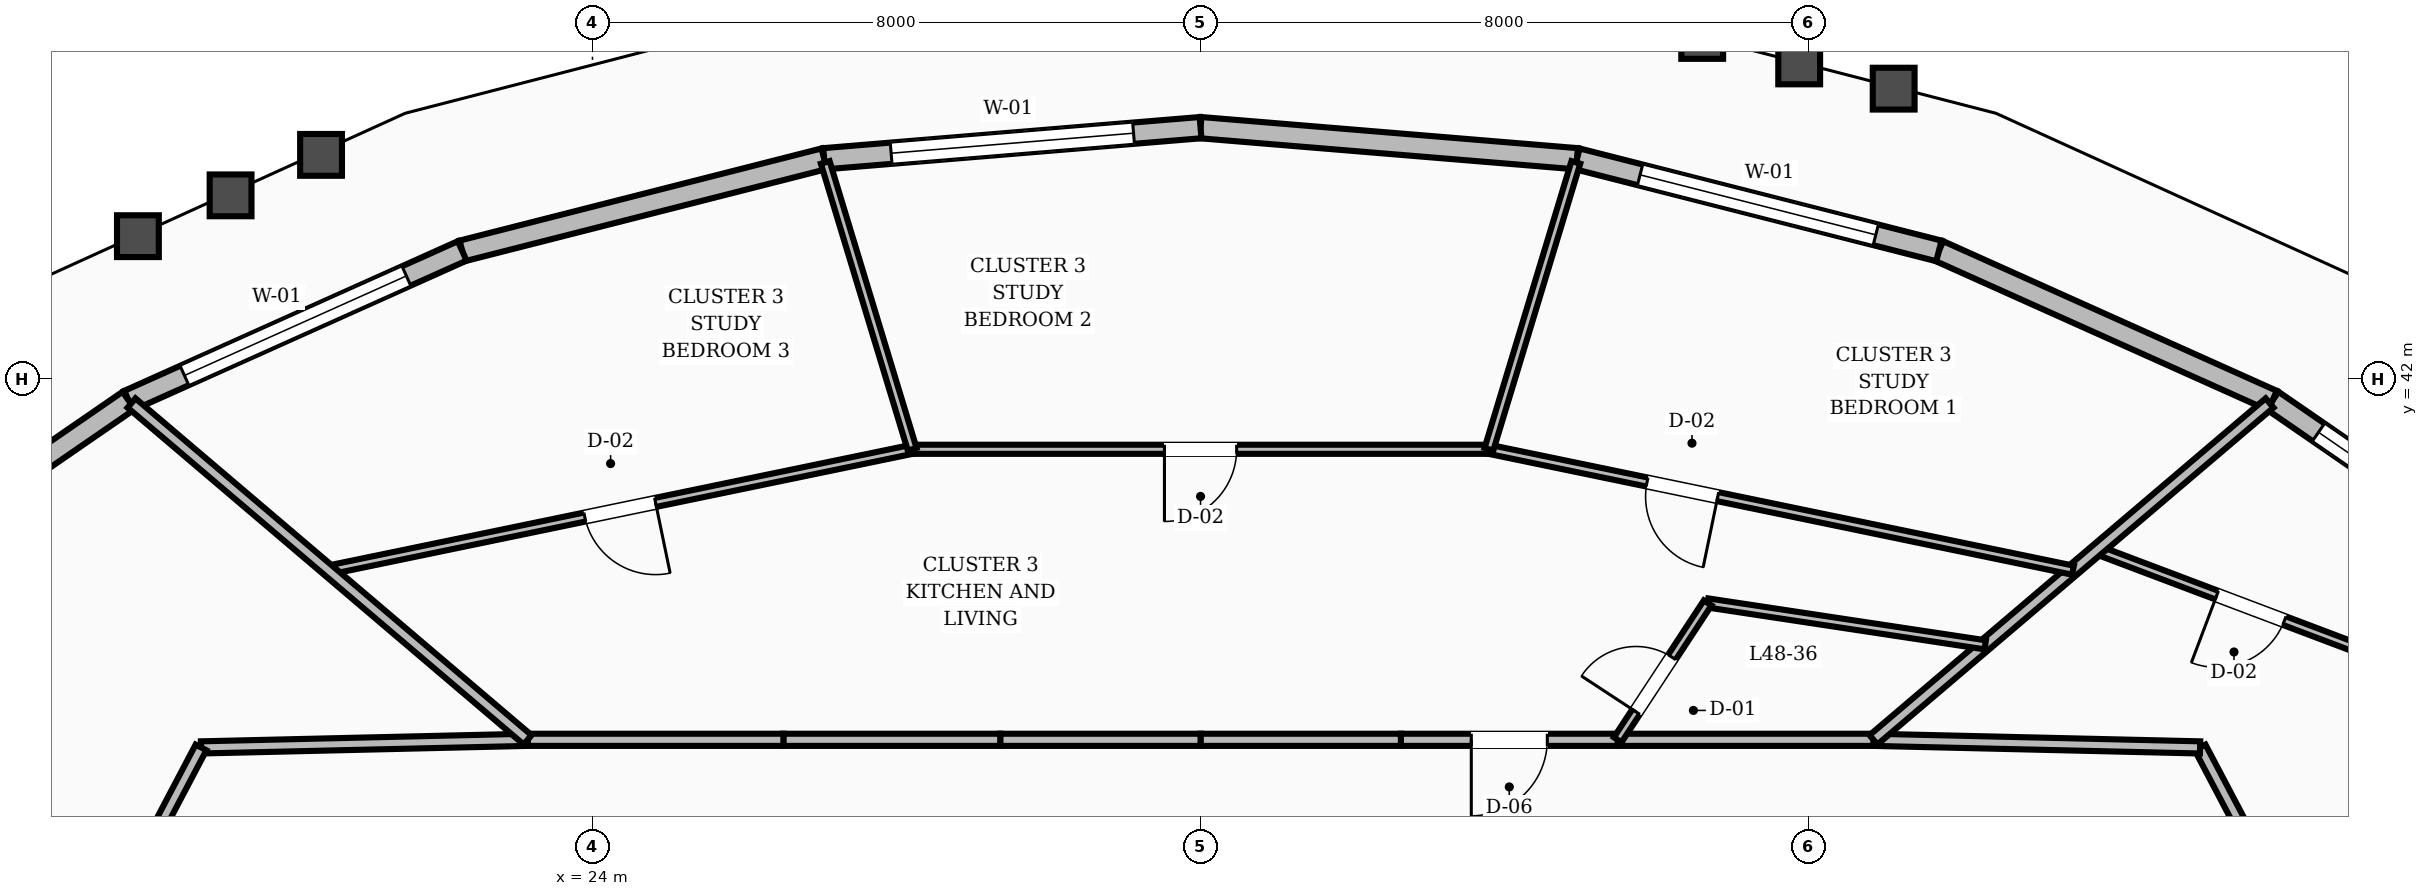
"""IFC4 building model, lengths in metres.
Left out: names, types, materials, properties, quantities, classifications, styles, units other than length and angle.
Written with IfcOpenShell. Run it as: python <this file> out.ifc"""

import sys

from ifc_helpers import new_model, si_unit, direction, frame, frame_2d, origin, place, context, subcontext, project, spatial, rectangle, extrude, element, fill, save


model = new_model("IFC4")
c1 = context("Model", 3, precision=1e-05, world=origin(), true_north=direction((0.0, 1.0)))
c2 = subcontext(c1, "Body", "Model", "MODEL_VIEW")
j1 = project(units=[si_unit("LENGTHUNIT", "METRE"), si_unit("PLANEANGLEUNIT", "RADIAN")], contexts=[c1])
p1 = place(None, origin())
s1 = spatial("IfcSite", under=j1, at=p1, CompositionType="ELEMENT")
p2 = place(p1, origin())
s2 = spatial("IfcBuilding", under=s1, at=p2, CompositionType="ELEMENT")
p3 = place(p2, frame((0.0, 0.0, 185.6)))
s3 = spatial("IfcBuildingStorey", under=s2, at=p3, CompositionType="ELEMENT", Elevation=185.6)
p4 = place(p3, frame((49.949, 39.064, 0.0), z_axis=(0.0, 0.0, 1.0), x_axis=(-0.823542873284, 0.567254031157, 0.0)))
e1 = element("IfcWall", 1, at=p4, inside=s3, PredefinedType="STANDARD", context=c2, shape_type="SweptSolid", body=[
    extrude(rectangle(XDim=4.671, YDim=0.28, at=frame_2d((2.335, 0.0))), origin(), (0.0, 0.0, 1.0), 2.82),
])
p5 = place(p4, frame((0.735, 0.0, 0.8)))
e2 = element("IfcOpeningElement", 2, at=p5, cuts=e1, PredefinedType="OPENING", context=c2, shape_type="SweptSolid", body=[
    extrude(rectangle(XDim=3.2, YDim=1.65, at=frame_2d((1.6, 0.825))), frame((0.0, 0.15, 0.0), z_axis=(0.0, -1.0, 0.0), x_axis=(1.0, 0.0, 0.0)), (0.0, 0.0, 1.0), 0.3),
])
p6 = place(p3, frame((46.102, 41.713, 0.0), z_axis=(0.0, 0.0, 1.0), x_axis=(-0.91240998906, 0.409277426525, 0.0)))
e3 = element("IfcWall", 3, at=p6, inside=s3, PredefinedType="STANDARD", context=c2, shape_type="SweptSolid", body=[
    extrude(rectangle(XDim=4.81, YDim=0.28, at=frame_2d((2.405, 0.0))), origin(), (0.0, 0.0, 1.0), 2.82),
])
p7 = place(p3, frame((41.714, 43.682, 0.0), z_axis=(0.0, 0.0, 1.0), x_axis=(-0.969081190832, 0.246742062842, 0.0)))
e4 = element("IfcWall", 4, at=p7, inside=s3, PredefinedType="STANDARD", context=c2, shape_type="SweptSolid", body=[
    extrude(rectangle(XDim=4.914, YDim=0.28, at=frame_2d((2.457, 0.0))), origin(), (0.0, 0.0, 1.0), 2.82),
])
p8 = place(p7, frame((0.857, 0.0, 0.8)))
e5 = element("IfcOpeningElement", 5, at=p8, cuts=e4, PredefinedType="OPENING", context=c2, shape_type="SweptSolid", body=[
    extrude(rectangle(XDim=3.2, YDim=1.65, at=frame_2d((1.6, 0.825))), frame((0.0, 0.15, 0.0), z_axis=(0.0, -1.0, 0.0), x_axis=(1.0, 0.0, 0.0)), (0.0, 0.0, 1.0), 0.3),
])
p9 = place(p3, frame((36.952, 44.894, 0.0), z_axis=(0.0, 0.0, 1.0), x_axis=(-0.996599760846, 0.082394882614, 0.0)))
e6 = element("IfcWall", 6, at=p9, inside=s3, PredefinedType="STANDARD", context=c2, shape_type="SweptSolid", body=[
    extrude(rectangle(XDim=4.969, YDim=0.28, at=frame_2d((2.484, 0.0))), origin(), (0.0, 0.0, 1.0), 2.82),
])
p10 = place(p3, frame((32.0, 45.304, 0.0), z_axis=(0.0, 0.0, 1.0), x_axis=(-0.996599760846, -0.082394882614, 0.0)))
e7 = element("IfcWall", 7, at=p10, inside=s3, PredefinedType="STANDARD", context=c2, shape_type="SweptSolid", body=[
    extrude(rectangle(XDim=4.969, YDim=0.28, at=frame_2d((2.484, 0.0))), origin(), (0.0, 0.0, 1.0), 2.82),
])
p11 = place(p10, frame((0.885, 0.0, 0.8)))
e8 = element("IfcOpeningElement", 8, at=p11, cuts=e7, PredefinedType="OPENING", context=c2, shape_type="SweptSolid", body=[
    extrude(rectangle(XDim=3.2, YDim=1.65, at=frame_2d((1.6, 0.825))), frame((0.0, 0.15, 0.0), z_axis=(0.0, -1.0, 0.0), x_axis=(1.0, 0.0, 0.0)), (0.0, 0.0, 1.0), 0.3),
])
p12 = place(p3, frame((27.048, 44.894, 0.0), z_axis=(0.0, 0.0, 1.0), x_axis=(-0.969081190832, -0.246742062842, 0.0)))
e9 = element("IfcWall", 9, at=p12, inside=s3, PredefinedType="STANDARD", context=c2, shape_type="SweptSolid", body=[
    extrude(rectangle(XDim=4.914, YDim=0.28, at=frame_2d((2.457, 0.0))), origin(), (0.0, 0.0, 1.0), 2.82),
])
p13 = place(p3, frame((22.286, 43.682, 0.0), z_axis=(0.0, 0.0, 1.0), x_axis=(-0.91240998906, -0.409277426525, 0.0)))
e10 = element("IfcWall", 10, at=p13, inside=s3, PredefinedType="STANDARD", context=c2, shape_type="SweptSolid", body=[
    extrude(rectangle(XDim=4.81, YDim=0.28, at=frame_2d((2.405, 0.0))), origin(), (0.0, 0.0, 1.0), 2.82),
])
p14 = place(p13, frame((0.805, 0.0, 0.8)))
e11 = element("IfcOpeningElement", 11, at=p14, cuts=e10, PredefinedType="OPENING", context=c2, shape_type="SweptSolid", body=[
    extrude(rectangle(XDim=3.2, YDim=1.65, at=frame_2d((1.6, 0.825))), frame((0.0, 0.15, 0.0), z_axis=(0.0, -1.0, 0.0), x_axis=(1.0, 0.0, 0.0)), (0.0, 0.0, 1.0), 0.3),
])
p15 = place(p3, frame((17.898, 41.713, 0.0), z_axis=(0.0, 0.0, 1.0), x_axis=(-0.823542873284, -0.567254031157, 0.0)))
e12 = element("IfcWall", 12, at=p15, inside=s3, PredefinedType="STANDARD", context=c2, shape_type="SweptSolid", body=[
    extrude(rectangle(XDim=4.671, YDim=0.28, at=frame_2d((2.335, 0.0))), origin(), (0.0, 0.0, 1.0), 2.82),
])
p16 = place(p3, frame((46.85, 33.923, 0.0), z_axis=(0.0, 0.0, 1.0), x_axis=(-0.466093963429, 0.884735224378, 0.0)))
e13 = element("IfcWall", 13, at=p16, inside=s3, PredefinedType="SOLIDWALL", context=c2, shape_type="SweptSolid", body=[
    extrude(rectangle(XDim=3.648, YDim=0.16, at=frame_2d((1.824, 0.0))), origin(), (0.0, 0.0, 1.0), 2.8),
])
p17 = place(p3, frame((45.15, 37.15, 0.0), z_axis=(0.0, 0.0, 1.0), x_axis=(-0.999728709658, 0.023291781507, 0.0)))
e14 = element("IfcWall", 14, at=p17, inside=s3, PredefinedType="SOLIDWALL", context=c2, shape_type="SweptSolid", body=[
    extrude(rectangle(XDim=4.298, YDim=0.16, at=frame_2d((2.149, 0.0))), origin(), (0.0, 0.0, 1.0), 2.8),
])
p18 = place(p3, frame((40.854, 37.25, 0.0), z_axis=(0.0, 0.0, 1.0), x_axis=(-1.0, 0.0, 0.0)))
e15 = element("IfcWall", 15, at=p18, inside=s3, PredefinedType="SOLIDWALL", context=c2, shape_type="SweptSolid", body=[
    extrude(rectangle(XDim=3.365, YDim=0.16, at=frame_2d((1.683, 0.0))), origin(), (0.0, 0.0, 1.0), 2.8),
])
p19 = place(p3, frame((37.488, 37.25, 0.0), z_axis=(0.0, 0.0, 1.0), x_axis=(-1.0, 0.0, 0.0)))
e16 = element("IfcWall", 16, at=p19, inside=s3, PredefinedType="SOLIDWALL", context=c2, shape_type="SweptSolid", body=[
    extrude(rectangle(XDim=2.853, YDim=0.16, at=frame_2d((1.426, 0.0))), origin(), (0.0, 0.0, 1.0), 2.8),
])
p20 = place(p19, frame((0.927, 0.0, 0.0)))
e17 = element("IfcOpeningElement", 17, at=p20, cuts=e16, PredefinedType="OPENING", context=c2, shape_type="SweptSolid", body=[
    extrude(rectangle(XDim=1.0, YDim=2.1, at=frame_2d((0.5, 1.05))), frame((0.0, 0.09, 0.0), z_axis=(0.0, -1.0, 0.0), x_axis=(1.0, 0.0, 0.0)), (0.0, 0.0, 1.0), 0.18),
])
for number, where, z_axis, x_axis in (
    (18, (34.635, 37.25, 0.0), (0.0, 0.0, 1.0), (-1.0, 0.0, 0.0)),
    (19, (32.0, 37.25, 0.0), (0.0, 0.0, 1.0), (-1.0, 0.0, 0.0)),
):
    element("IfcWall", number, at=place(p3, frame(where, z_axis=z_axis, x_axis=x_axis)), inside=s3, PredefinedType="SOLIDWALL", context=c2, shape_type="SweptSolid", body=[
        extrude(rectangle(XDim=2.635, YDim=0.16, at=frame_2d((1.318, 0.0))), origin(), (0.0, 0.0, 1.0), 2.8),
    ])
p21 = place(p3, frame((29.365, 37.25, 0.0), z_axis=(0.0, 0.0, 1.0), x_axis=(-1.0, 0.0, 0.0)))
e20 = element("IfcWall", 20, at=p21, inside=s3, PredefinedType="SOLIDWALL", context=c2, shape_type="SweptSolid", body=[
    extrude(rectangle(XDim=2.853, YDim=0.16, at=frame_2d((1.426, 0.0))), origin(), (0.0, 0.0, 1.0), 2.8),
])
p22 = place(p3, frame((26.512, 37.25, 0.0), z_axis=(0.0, 0.0, 1.0), x_axis=(-1.0, 0.0, 0.0)))
e21 = element("IfcWall", 21, at=p22, inside=s3, PredefinedType="SOLIDWALL", context=c2, shape_type="SweptSolid", body=[
    extrude(rectangle(XDim=3.365, YDim=0.16, at=frame_2d((1.683, 0.0))), origin(), (0.0, 0.0, 1.0), 2.8),
])
p23 = place(p3, frame((23.146, 37.25, 0.0), z_axis=(0.0, 0.0, 1.0), x_axis=(-0.999728709658, -0.023291781507, 0.0)))
e22 = element("IfcWall", 22, at=p23, inside=s3, PredefinedType="SOLIDWALL", context=c2, shape_type="SweptSolid", body=[
    extrude(rectangle(XDim=4.298, YDim=0.16, at=frame_2d((2.149, 0.0))), origin(), (0.0, 0.0, 1.0), 2.8),
])
p24 = place(p3, frame((18.85, 37.15, 0.0), z_axis=(0.0, 0.0, 1.0), x_axis=(-0.466093963429, -0.884735224378, 0.0)))
e23 = element("IfcWall", 23, at=p24, inside=s3, PredefinedType="SOLIDWALL", context=c2, shape_type="SweptSolid", body=[
    extrude(rectangle(XDim=3.648, YDim=0.16, at=frame_2d((1.824, 0.0))), origin(), (0.0, 0.0, 1.0), 2.8),
])
p25 = place(p3, frame((47.837, 38.222, 0.0), z_axis=(0.0, 0.0, 1.0), x_axis=(-0.935484123415, 0.353368723627, 0.0)))
e24 = element("IfcWall", 24, at=p25, inside=s3, PredefinedType="PARTITIONING", context=c2, shape_type="SweptSolid", body=[
    extrude(rectangle(XDim=4.324, YDim=0.12, at=frame_2d((2.162, 0.0))), origin(), (0.0, 0.0, 1.0), 2.8),
])
p26 = place(p25, frame((1.687, 0.0, 0.0)))
e25 = element("IfcOpeningElement", 25, at=p26, cuts=e24, PredefinedType="OPENING", context=c2, shape_type="SweptSolid", body=[
    extrude(rectangle(XDim=0.95, YDim=2.1, at=frame_2d((0.475, 1.05))), frame((0.0, 0.07, 0.0), z_axis=(0.0, -1.0, 0.0), x_axis=(1.0, 0.0, 0.0)), (0.0, 0.0, 1.0), 0.14),
])
p27 = place(p3, frame((40.854, 37.25, 0.0), z_axis=(0.0, 0.0, 1.0), x_axis=(0.761808080293, 0.647802785421, 0.0)))
e26 = element("IfcWall", 26, at=p27, inside=s3, PredefinedType="SOLIDWALL", context=c2, shape_type="SweptSolid", body=[
    extrude(rectangle(XDim=6.84, YDim=0.16, at=frame_2d((3.42, 0.0))), origin(), (0.0, 0.0, 1.0), 2.8),
])
p28 = place(p3, frame((42.323, 38.5, 0.0), z_axis=(0.0, 0.0, 1.0), x_axis=(-0.988795772928, 0.149274644332, 0.0)))
e27 = element("IfcWall", 27, at=p28, inside=s3, PredefinedType="PARTITIONING", context=c2, shape_type="SweptSolid", body=[
    extrude(rectangle(XDim=3.693, YDim=0.12, at=frame_2d((1.846, 0.0))), origin(), (0.0, 0.0, 1.0), 2.8),
])
p29 = place(p3, frame((37.488, 37.25, 0.0), z_axis=(0.0, 0.0, 1.0), x_axis=(0.549039971379, 0.835796093451, 0.0)))
e28 = element("IfcWall", 28, at=p29, inside=s3, PredefinedType="PARTITIONING", context=c2, shape_type="SweptSolid", body=[
    extrude(rectangle(XDim=2.155, YDim=0.12, at=frame_2d((1.077, 0.0))), origin(), (0.0, 0.0, 1.0), 2.8),
])
p30 = place(p29, frame((0.44, 0.0, 0.0)))
e29 = element("IfcOpeningElement", 29, at=p30, cuts=e28, PredefinedType="OPENING", context=c2, shape_type="SweptSolid", body=[
    extrude(rectangle(XDim=0.86, YDim=2.1, at=frame_2d((0.43, 1.05))), frame((0.0, 0.07, 0.0), z_axis=(0.0, -1.0, 0.0), x_axis=(1.0, 0.0, 0.0)), (0.0, 0.0, 1.0), 0.14),
])
p31 = place(p3, frame((43.478, 39.482, 0.0), z_axis=(0.0, 0.0, 1.0), x_axis=(-0.979241044983, 0.202699225013, 0.0)))
e30 = element("IfcWall", 30, at=p31, inside=s3, PredefinedType="PARTITIONING", context=c2, shape_type="SweptSolid", body=[
    extrude(rectangle(XDim=7.847, YDim=0.12, at=frame_2d((3.923, 0.0))), origin(), (0.0, 0.0, 1.0), 2.8),
])
p32 = place(p31, frame((4.772, 0.0, 0.0)))
e31 = element("IfcOpeningElement", 31, at=p32, cuts=e30, PredefinedType="OPENING", context=c2, shape_type="SweptSolid", body=[
    extrude(rectangle(XDim=0.95, YDim=2.1, at=frame_2d((0.475, 1.05))), frame((0.0, 0.07, 0.0), z_axis=(0.0, -1.0, 0.0), x_axis=(1.0, 0.0, 0.0)), (0.0, 0.0, 1.0), 0.14),
])
p33 = place(p3, frame((35.794, 41.072, 0.0), z_axis=(0.0, 0.0, 1.0), x_axis=(-1.0, 0.0, 0.0)))
e32 = element("IfcWall", 32, at=p33, inside=s3, PredefinedType="PARTITIONING", context=c2, shape_type="SweptSolid", body=[
    extrude(rectangle(XDim=7.587, YDim=0.12, at=frame_2d((3.794, 0.0))), origin(), (0.0, 0.0, 1.0), 2.8),
])
p34 = place(p33, frame((3.319, 0.0, 0.0)))
e33 = element("IfcOpeningElement", 33, at=p34, cuts=e32, PredefinedType="OPENING", context=c2, shape_type="SweptSolid", body=[
    extrude(rectangle(XDim=0.95, YDim=2.1, at=frame_2d((0.475, 1.05))), frame((0.0, 0.07, 0.0), z_axis=(0.0, -1.0, 0.0), x_axis=(1.0, 0.0, 0.0)), (0.0, 0.0, 1.0), 0.14),
])
p35 = place(p3, frame((35.794, 41.072, 0.0), z_axis=(0.0, 0.0, 1.0), x_axis=(0.290033167967, 0.95701659415, 0.0)))
e34 = element("IfcWall", 34, at=p35, inside=s3, PredefinedType="PARTITIONING", context=c2, shape_type="SweptSolid", body=[
    extrude(rectangle(XDim=3.944, YDim=0.12, at=frame_2d((1.972, 0.0))), origin(), (0.0, 0.0, 1.0), 2.8),
])
p36 = place(p3, frame((28.206, 41.072, 0.0), z_axis=(0.0, 0.0, 1.0), x_axis=(-0.979241044983, -0.202699225013, 0.0)))
e35 = element("IfcWall", 35, at=p36, inside=s3, PredefinedType="PARTITIONING", context=c2, shape_type="SweptSolid", body=[
    extrude(rectangle(XDim=7.847, YDim=0.12, at=frame_2d((3.923, 0.0))), origin(), (0.0, 0.0, 1.0), 2.8),
])
p37 = place(p36, frame((3.448, 0.0, 0.0)))
e36 = element("IfcOpeningElement", 36, at=p37, cuts=e35, PredefinedType="OPENING", context=c2, shape_type="SweptSolid", body=[
    extrude(rectangle(XDim=0.95, YDim=2.1, at=frame_2d((0.475, 1.05))), frame((0.0, 0.07, 0.0), z_axis=(0.0, -1.0, 0.0), x_axis=(1.0, 0.0, 0.0)), (0.0, 0.0, 1.0), 0.14),
])
p38 = place(p3, frame((28.206, 41.072, 0.0), z_axis=(0.0, 0.0, 1.0), x_axis=(-0.290033167967, 0.95701659415, 0.0)))
e37 = element("IfcWall", 37, at=p38, inside=s3, PredefinedType="PARTITIONING", context=c2, shape_type="SweptSolid", body=[
    extrude(rectangle(XDim=3.944, YDim=0.12, at=frame_2d((1.972, 0.0))), origin(), (0.0, 0.0, 1.0), 2.8),
])
p39 = place(p3, frame((23.146, 37.25, 0.0), z_axis=(0.0, 0.0, 1.0), x_axis=(-0.761808080293, 0.647802785421, 0.0)))
e38 = element("IfcWall", 38, at=p39, inside=s3, PredefinedType="SOLIDWALL", context=c2, shape_type="SweptSolid", body=[
    extrude(rectangle(XDim=6.84, YDim=0.16, at=frame_2d((3.42, 0.0))), origin(), (0.0, 0.0, 1.0), 2.8),
])
p40 = place(p5, origin())
e39 = element("IfcWindow", 39, at=p40, inside=s3, PartitioningType="SINGLE_PANEL", PredefinedType="WINDOW", context=c2, shape_type="SweptSolid", body=[
    extrude(rectangle(XDim=3.2, YDim=1.65, at=frame_2d((1.6, 0.825))), frame((0.0, 0.03, 0.0), z_axis=(0.0, -1.0, 0.0), x_axis=(1.0, 0.0, 0.0)), (0.0, 0.0, 1.0), 0.06),
])
fill(e2, e39)
p41 = place(p8, origin())
e40 = element("IfcWindow", 40, at=p41, inside=s3, PartitioningType="SINGLE_PANEL", PredefinedType="WINDOW", context=c2, shape_type="SweptSolid", body=[
    extrude(rectangle(XDim=3.2, YDim=1.65, at=frame_2d((1.6, 0.825))), frame((0.0, 0.03, 0.0), z_axis=(0.0, -1.0, 0.0), x_axis=(1.0, 0.0, 0.0)), (0.0, 0.0, 1.0), 0.06),
])
fill(e5, e40)
p42 = place(p11, origin())
e41 = element("IfcWindow", 41, at=p42, inside=s3, PartitioningType="SINGLE_PANEL", PredefinedType="WINDOW", context=c2, shape_type="SweptSolid", body=[
    extrude(rectangle(XDim=3.2, YDim=1.65, at=frame_2d((1.6, 0.825))), frame((0.0, 0.03, 0.0), z_axis=(0.0, -1.0, 0.0), x_axis=(1.0, 0.0, 0.0)), (0.0, 0.0, 1.0), 0.06),
])
fill(e8, e41)
p43 = place(p14, origin())
e42 = element("IfcWindow", 42, at=p43, inside=s3, PartitioningType="SINGLE_PANEL", PredefinedType="WINDOW", context=c2, shape_type="SweptSolid", body=[
    extrude(rectangle(XDim=3.2, YDim=1.65, at=frame_2d((1.6, 0.825))), frame((0.0, 0.03, 0.0), z_axis=(0.0, -1.0, 0.0), x_axis=(1.0, 0.0, 0.0)), (0.0, 0.0, 1.0), 0.06),
])
fill(e11, e42)
p44 = place(p26, origin())
e43 = element("IfcDoor", 43, at=p44, inside=s3, OperationType="SINGLE_SWING_RIGHT", PredefinedType="DOOR", context=c2, shape_type="SweptSolid", body=[
    extrude(rectangle(XDim=0.95, YDim=2.1, at=frame_2d((0.475, 1.05))), frame((0.0, 0.025, 0.0), z_axis=(0.0, -1.0, 0.0), x_axis=(1.0, 0.0, 0.0)), (0.0, 0.0, 1.0), 0.05),
])
fill(e25, e43)
p45 = place(p30, origin())
e44 = element("IfcDoor", 44, at=p45, inside=s3, OperationType="SINGLE_SWING_LEFT", PredefinedType="DOOR", context=c2, shape_type="SweptSolid", body=[
    extrude(rectangle(XDim=0.86, YDim=2.1, at=frame_2d((0.43, 1.05))), frame((0.0, 0.025, 0.0), z_axis=(0.0, -1.0, 0.0), x_axis=(1.0, 0.0, 0.0)), (0.0, 0.0, 1.0), 0.05),
])
fill(e29, e44)
p46 = place(p20, origin())
e45 = element("IfcDoor", 45, at=p46, inside=s3, OperationType="SINGLE_SWING_RIGHT", PredefinedType="DOOR", context=c2, shape_type="SweptSolid", body=[
    extrude(rectangle(XDim=1.0, YDim=2.1, at=frame_2d((0.5, 1.05))), frame((0.0, 0.025, 0.0), z_axis=(0.0, -1.0, 0.0), x_axis=(1.0, 0.0, 0.0)), (0.0, 0.0, 1.0), 0.05),
])
fill(e17, e45)
p47 = place(p32, origin())
e46 = element("IfcDoor", 46, at=p47, inside=s3, OperationType="SINGLE_SWING_LEFT", PredefinedType="DOOR", context=c2, shape_type="SweptSolid", body=[
    extrude(rectangle(XDim=0.95, YDim=2.1, at=frame_2d((0.475, 1.05))), frame((0.0, 0.025, 0.0), z_axis=(0.0, -1.0, 0.0), x_axis=(1.0, 0.0, 0.0)), (0.0, 0.0, 1.0), 0.05),
])
fill(e31, e46)
p48 = place(p34, origin())
e47 = element("IfcDoor", 47, at=p48, inside=s3, OperationType="SINGLE_SWING_RIGHT", PredefinedType="DOOR", context=c2, shape_type="SweptSolid", body=[
    extrude(rectangle(XDim=0.95, YDim=2.1, at=frame_2d((0.475, 1.05))), frame((0.0, 0.025, 0.0), z_axis=(0.0, -1.0, 0.0), x_axis=(1.0, 0.0, 0.0)), (0.0, 0.0, 1.0), 0.05),
])
fill(e33, e47)
p49 = place(p37, origin())
e48 = element("IfcDoor", 48, at=p49, inside=s3, OperationType="SINGLE_SWING_LEFT", PredefinedType="DOOR", context=c2, shape_type="SweptSolid", body=[
    extrude(rectangle(XDim=0.95, YDim=2.1, at=frame_2d((0.475, 1.05))), frame((0.0, 0.025, 0.0), z_axis=(0.0, -1.0, 0.0), x_axis=(1.0, 0.0, 0.0)), (0.0, 0.0, 1.0), 0.05),
])
fill(e36, e48)
save(model, sys.argv[1])
